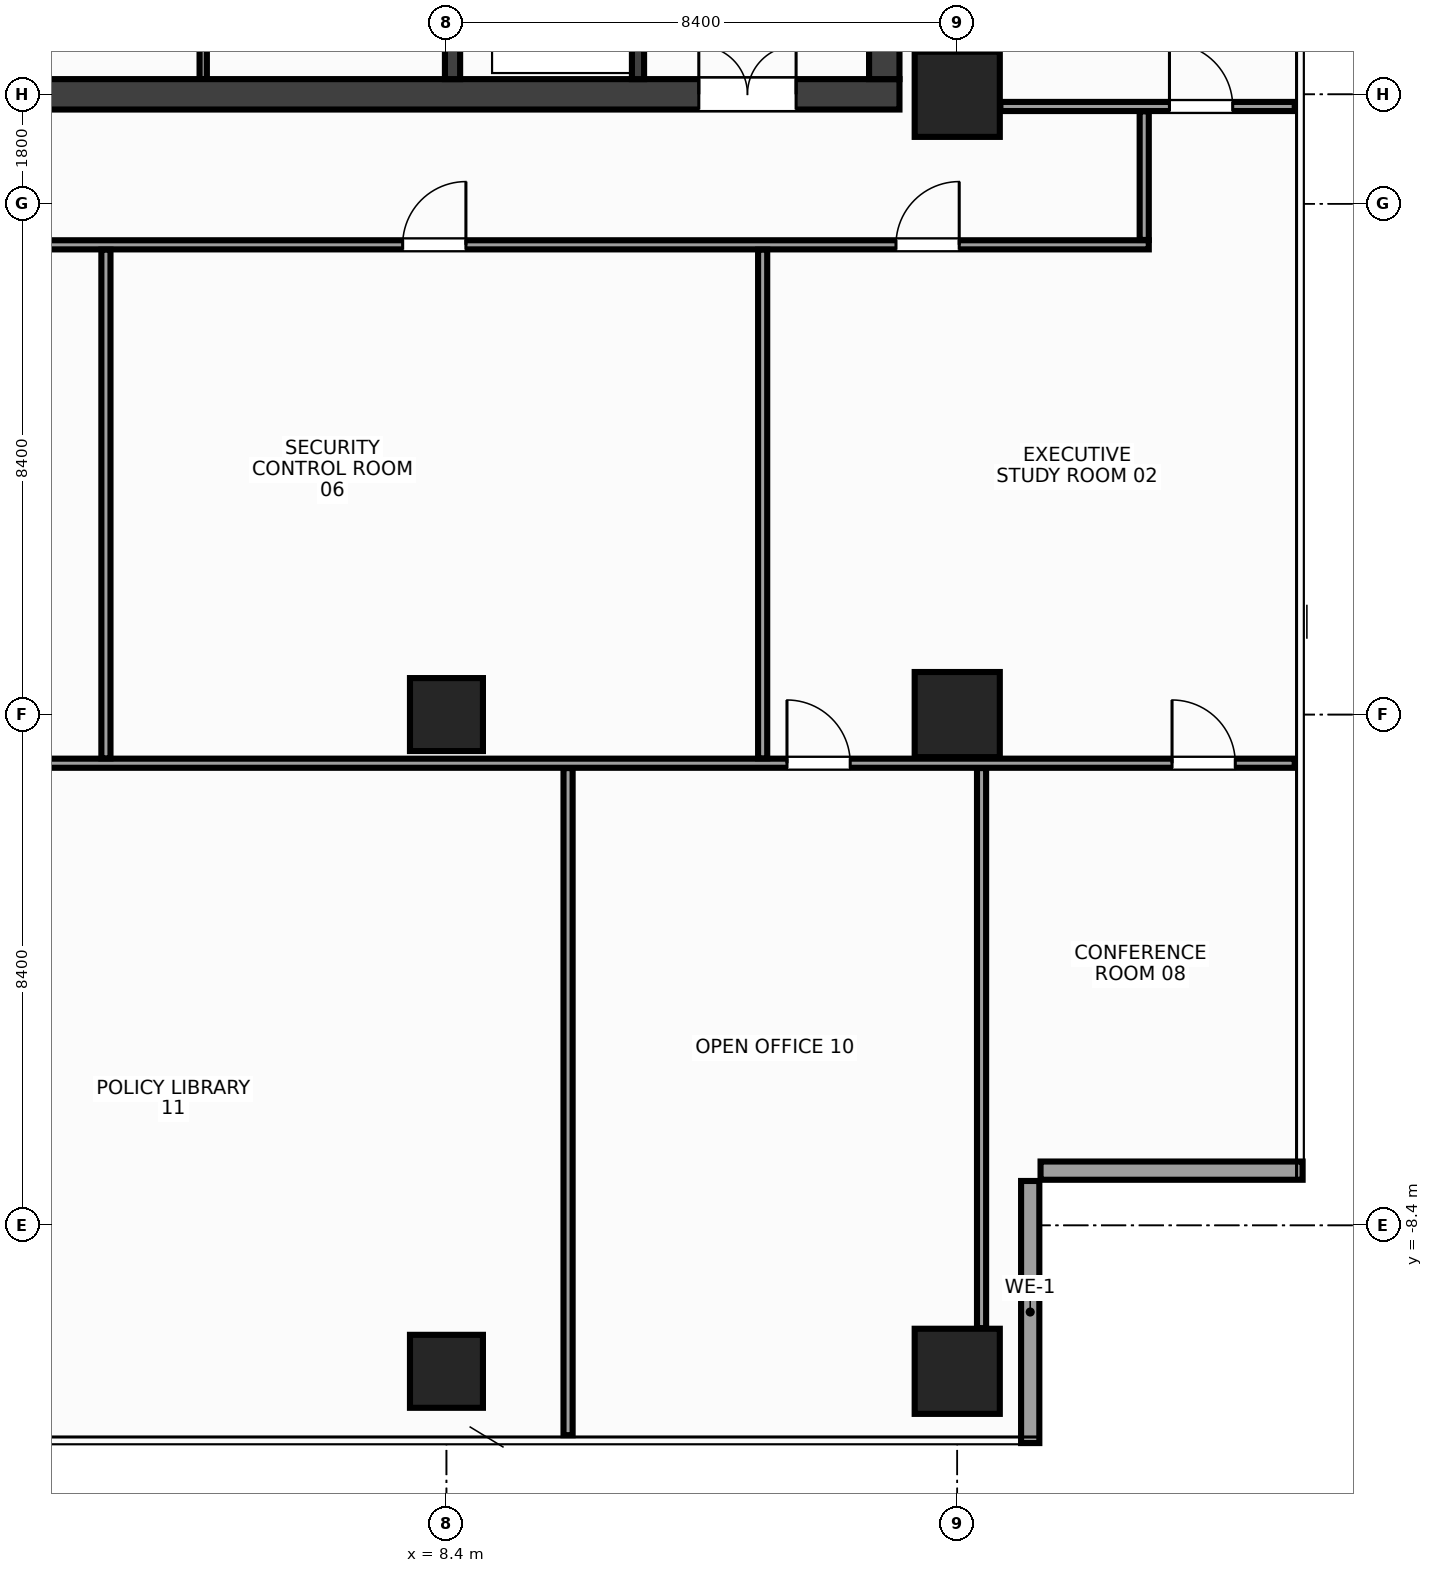
"""IFC4 building model, lengths in metres.
Left out: names, types, materials, properties, quantities, classifications, styles, units other than length and angle.
Written with IfcOpenShell. Run it as: python <this file> out.ifc"""

import sys

from ifc_helpers import new_model, si_unit, direction, frame, frame_2d, origin, origin_2d, place, context, subcontext, project, spatial, rectangle, extrude, source, transform, mapped, element, fill, save


model = new_model("IFC4")
c1 = context("Model", 3, precision=1e-05, world=origin(), true_north=direction((0.0, 1.0)))
c2 = subcontext(c1, "Body", "Model", "MODEL_VIEW")
j1 = project(units=[si_unit("LENGTHUNIT", "METRE"), si_unit("PLANEANGLEUNIT", "RADIAN")], contexts=[c1])
p1 = place(None, origin())
s1 = spatial("IfcSite", under=j1, at=p1, CompositionType="ELEMENT")
p2 = place(p1, origin())
s2 = spatial("IfcBuilding", under=s1, at=p2, CompositionType="ELEMENT")
p3 = place(p2, frame((0.0, 0.0, 243.2)))
s3 = spatial("IfcBuildingStorey", under=s2, at=p3, CompositionType="ELEMENT", Elevation=243.2)
m1 = source(origin(), c2, "Body", "SweptSolid", [
    extrude(rectangle(XDim=31.7, YDim=0.5, at=frame_2d((15.85, 0.0))), origin(), (0.0, 0.0, 1.0), 3.6),
])
p4 = place(p3, frame((-15.85, 10.2, 0.0), z_axis=(0.0, 0.0, 1.0), x_axis=(1.0, 0.0, 0.0)))
e1 = element("IfcWall", 1, at=p4, inside=s3, PredefinedType="SHEAR", context=c2, shape_type="MappedRepresentation", body=[
    mapped(m1, transform((0.0, 0.0, 0.0), x_axis=(1.0, 0.0, 0.0), y_axis=(0.0, 1.0, 0.0), z_axis=(0.0, 0.0, 1.0), scale=1.0)),
])
p5 = place(p4, frame((1.7, 0.0, 0.0)))
e2 = element("IfcOpeningElement", 2, at=p5, cuts=e1, PredefinedType="OPENING", context=c2, shape_type="SweptSolid", body=[
    extrude(rectangle(XDim=1.6, YDim=2.15, at=frame_2d((0.8, 1.075))), frame((0.0, 0.262, 0.0), z_axis=(0.0, -1.0, 0.0), x_axis=(1.0, 0.0, 0.0)), (0.0, 0.0, 1.0), 0.524),
])
p6 = place(p4, frame((28.4, 0.0, 0.0)))
e3 = element("IfcOpeningElement", 3, at=p6, cuts=e1, PredefinedType="OPENING", context=c2, shape_type="SweptSolid", body=[
    extrude(rectangle(XDim=1.6, YDim=2.15, at=frame_2d((0.8, 1.075))), frame((0.0, 0.262, 0.0), z_axis=(0.0, -1.0, 0.0), x_axis=(1.0, 0.0, 0.0)), (0.0, 0.0, 1.0), 0.524),
])
p7 = place(p4, frame((15.1, 0.0, 0.0)))
e4 = element("IfcOpeningElement", 4, at=p7, cuts=e1, PredefinedType="OPENING", context=c2, shape_type="SweptSolid", body=[
    extrude(rectangle(XDim=1.5, YDim=2.2, at=frame_2d((0.75, 1.1))), frame((0.0, 0.262, 0.0), z_axis=(0.0, -1.0, 0.0), x_axis=(1.0, 0.0, 0.0)), (0.0, 0.0, 1.0), 0.524),
])
m2 = source(origin(), c2, "Body", "SweptSolid", [
    extrude(rectangle(XDim=13.1, YDim=0.5, at=frame_2d((6.55, 0.0))), origin(), (0.0, 0.0, 1.0), 3.6),
])
p8 = place(p3, frame((15.6, 10.45, 0.0), z_axis=(0.0, 0.0, 1.0), x_axis=(0.0, 1.0, 0.0)))
e5 = element("IfcWall", 5, at=p8, inside=s3, PredefinedType="SHEAR", context=c2, shape_type="MappedRepresentation", body=[
    mapped(m2, transform((0.0, 0.0, 0.0), x_axis=(1.0, 0.0, 0.0), y_axis=(0.0, 1.0, 0.0), z_axis=(0.0, 0.0, 1.0), scale=1.0)),
])
m3 = source(origin(), c2, "Body", "SweptSolid", [
    extrude(rectangle(XDim=13.1, YDim=0.25, at=frame_2d((6.55, 0.0))), origin(), (0.0, 0.0, 1.0), 3.6),
])
p9 = place(p3, frame((8.5, 10.45, 0.0), z_axis=(0.0, 0.0, 1.0), x_axis=(0.0, 1.0, 0.0)))
e6 = element("IfcWall", 6, at=p9, inside=s3, PredefinedType="SHEAR", context=c2, shape_type="MappedRepresentation", body=[
    mapped(m3, transform((0.0, 0.0, 0.0), x_axis=(1.0, 0.0, 0.0), y_axis=(0.0, 1.0, 0.0), z_axis=(0.0, 0.0, 1.0), scale=1.0)),
])
p10 = place(p9, frame((10.0, 0.0, 0.0)))
e7 = element("IfcOpeningElement", 7, at=p10, cuts=e6, PredefinedType="OPENING", context=c2, shape_type="SweptSolid", body=[
    extrude(rectangle(XDim=0.95, YDim=2.15, at=frame_2d((0.475, 1.075))), frame((0.0, 0.137, 0.0), z_axis=(0.0, -1.0, 0.0), x_axis=(1.0, 0.0, 0.0)), (0.0, 0.0, 1.0), 0.274),
])
m4 = source(origin(), c2, "Body", "SweptSolid", [
    extrude(rectangle(XDim=3.2, YDim=0.2, at=frame_2d((1.6, 0.0))), origin(), (0.0, 0.0, 1.0), 3.6),
])
p11 = place(p3, frame((11.55, 10.45, 0.0), z_axis=(0.0, 0.0, 1.0), x_axis=(0.0, 1.0, 0.0)))
e8 = element("IfcWall", 8, at=p11, inside=s3, PredefinedType="SHEAR", context=c2, shape_type="MappedRepresentation", body=[
    mapped(m4, transform((0.0, 0.0, 0.0), x_axis=(1.0, 0.0, 0.0), y_axis=(0.0, 1.0, 0.0), z_axis=(0.0, 0.0, 1.0), scale=1.0)),
])
p12 = place(p11, frame((0.9, 0.0, 0.0)))
e9 = element("IfcOpeningElement", 9, at=p12, cuts=e8, PredefinedType="OPENING", context=c2, shape_type="SweptSolid", body=[
    extrude(rectangle(XDim=1.1, YDim=2.15, at=frame_2d((0.55, 1.075))), frame((0.0, 0.112, 0.0), z_axis=(0.0, -1.0, 0.0), x_axis=(1.0, 0.0, 0.0)), (0.0, 0.0, 1.0), 0.224),
])
m5 = source(origin(), c2, "Body", "SweptSolid", [
    extrude(rectangle(XDim=1.4, YDim=1.4, at=origin_2d()), origin(), (0.0, 0.0, 1.0), 3.6),
])
for number, where, z_axis, x_axis in (
    (10, (16.8, -10.8, 0.0), (0.0, 0.0, 1.0), (1.0, 0.0, 0.0)),
    (11, (16.8, 0.0, 0.0), (0.0, 0.0, 1.0), (1.0, 0.0, 0.0)),
    (12, (16.8, 10.2, 0.0), (0.0, 0.0, 1.0), (1.0, 0.0, 0.0)),
):
    element("IfcColumn", number, at=place(p3, frame(where, z_axis=z_axis, x_axis=x_axis)), inside=s3, PredefinedType="COLUMN", context=c2, shape_type="MappedRepresentation", body=[
        mapped(m5, transform((0.0, 0.0, 0.0), x_axis=(1.0, 0.0, 0.0), y_axis=(0.0, 1.0, 0.0), z_axis=(0.0, 0.0, 1.0), scale=1.0)),
    ])
m6 = source(origin(), c2, "Body", "SweptSolid", [
    extrude(rectangle(XDim=1.2, YDim=1.2, at=origin_2d()), origin(), (0.0, 0.0, 1.0), 3.6),
])
for number, where, z_axis, x_axis in (
    (13, (8.4, 0.0, 0.0), (0.0, 0.0, 1.0), (1.0, 0.0, 0.0)),
    (14, (8.4, -10.8, 0.0), (0.0, 0.0, 1.0), (1.0, 0.0, 0.0)),
):
    element("IfcColumn", number, at=place(p3, frame(where, z_axis=z_axis, x_axis=x_axis)), inside=s3, PredefinedType="COLUMN", context=c2, shape_type="MappedRepresentation", body=[
        mapped(m6, transform((0.0, 0.0, 0.0), x_axis=(1.0, 0.0, 0.0), y_axis=(0.0, 1.0, 0.0), z_axis=(0.0, 0.0, 1.0), scale=1.0)),
    ])
m7 = source(origin(), c2, "Body", "SweptSolid", [
    extrude(rectangle(XDim=4.31, YDim=0.3, at=frame_2d((2.155, 0.0))), origin(), (0.0, 0.0, 1.0), 2.75),
])
for number, where, z_axis, x_axis in (
    (15, (18.0, -11.98, 0.0), (0.0, 0.0, 1.0), (0.0, 1.0, 0.0)),
    (16, (18.17, -7.5, 0.0), (0.0, 0.0, 1.0), (1.0, 0.0, 0.0)),
):
    element("IfcWall", number, at=place(p3, frame(where, z_axis=z_axis, x_axis=x_axis)), inside=s3, PredefinedType="STANDARD", context=c2, shape_type="MappedRepresentation", body=[
        mapped(m7, transform((0.0, 0.0, 0.0), x_axis=(1.0, 0.0, 0.0), y_axis=(0.0, 1.0, 0.0), z_axis=(0.0, 0.0, 1.0), scale=1.0)),
    ])
m8 = source(origin(), c2, "Body", "SweptSolid", [
    extrude(rectangle(XDim=3.49, YDim=0.12, at=frame_2d((1.745, 0.0))), origin(), (0.0, 0.0, 1.0), 3.37),
])
p13 = place(p3, frame((4.4, 10.45, 0.0), z_axis=(0.0, 0.0, 1.0), x_axis=(0.0, 1.0, 0.0)))
e17 = element("IfcWall", 17, at=p13, inside=s3, PredefinedType="PARTITIONING", context=c2, shape_type="MappedRepresentation", body=[
    mapped(m8, transform((0.0, 0.0, 0.0), x_axis=(1.0, 0.0, 0.0), y_axis=(0.0, 1.0, 0.0), z_axis=(0.0, 0.0, 1.0), scale=1.0)),
])
m9 = source(origin(), c2, "Body", "SweptSolid", [
    extrude(rectangle(XDim=4.84, YDim=0.15, at=frame_2d((2.42, 0.0))), origin(), (0.0, 0.0, 1.0), 3.37),
])
p14 = place(p3, frame((17.51, 10.0, 0.0), z_axis=(0.0, 0.0, 1.0), x_axis=(1.0, 0.0, 0.0)))
e18 = element("IfcWall", 18, at=p14, inside=s3, PredefinedType="PARTITIONING", context=c2, shape_type="MappedRepresentation", body=[
    mapped(m9, transform((0.0, 0.0, 0.0), x_axis=(1.0, 0.0, 0.0), y_axis=(0.0, 1.0, 0.0), z_axis=(0.0, 0.0, 1.0), scale=1.0)),
])
p15 = place(p14, frame((2.78, 0.0, 0.0)))
e19 = element("IfcOpeningElement", 19, at=p15, cuts=e18, PredefinedType="OPENING", context=c2, shape_type="SweptSolid", body=[
    extrude(rectangle(XDim=1.04, YDim=2.2, at=frame_2d((0.52, 1.1))), frame((0.0, 0.087, 0.0), z_axis=(0.0, -1.0, 0.0), x_axis=(1.0, 0.0, 0.0)), (0.0, 0.0, 1.0), 0.174),
])
m10 = source(origin(), c2, "Body", "SweptSolid", [
    extrude(rectangle(XDim=21.9, YDim=0.15, at=frame_2d((10.95, 0.0))), origin(), (0.0, 0.0, 1.0), 2.755),
])
p16 = place(p3, frame((-1.95, 7.725, 0.0), z_axis=(0.0, 0.0, 1.0), x_axis=(1.0, 0.0, 0.0)))
e20 = element("IfcWall", 20, at=p16, inside=s3, PredefinedType="PARTITIONING", context=c2, shape_type="MappedRepresentation", body=[
    mapped(m10, transform((0.0, 0.0, 0.0), x_axis=(1.0, 0.0, 0.0), y_axis=(0.0, 1.0, 0.0), z_axis=(0.0, 0.0, 1.0), scale=1.0)),
])
p17 = place(p16, frame((17.742, 0.0, 0.0)))
e21 = element("IfcOpeningElement", 21, at=p17, cuts=e20, PredefinedType="OPENING", context=c2, shape_type="SweptSolid", body=[
    extrude(rectangle(XDim=1.04, YDim=2.2, at=frame_2d((0.52, 1.1))), frame((0.0, 0.087, 0.0), z_axis=(0.0, -1.0, 0.0), x_axis=(1.0, 0.0, 0.0)), (0.0, 0.0, 1.0), 0.174),
])
p18 = place(p16, frame((1.877, 0.0, 0.0)))
e22 = element("IfcOpeningElement", 22, at=p18, cuts=e20, PredefinedType="OPENING", context=c2, shape_type="SweptSolid", body=[
    extrude(rectangle(XDim=1.04, YDim=2.2, at=frame_2d((0.52, 1.1))), frame((0.0, 0.087, 0.0), z_axis=(0.0, -1.0, 0.0), x_axis=(1.0, 0.0, 0.0)), (0.0, 0.0, 1.0), 0.174),
])
p19 = place(p16, frame((9.63, 0.0, 0.0)))
e23 = element("IfcOpeningElement", 23, at=p19, cuts=e20, PredefinedType="OPENING", context=c2, shape_type="SweptSolid", body=[
    extrude(rectangle(XDim=1.04, YDim=2.2, at=frame_2d((0.52, 1.1))), frame((0.0, 0.087, 0.0), z_axis=(0.0, -1.0, 0.0), x_axis=(1.0, 0.0, 0.0)), (0.0, 0.0, 1.0), 0.174),
])
m11 = source(origin(), c2, "Body", "SweptSolid", [
    extrude(rectangle(XDim=2.115, YDim=0.15, at=frame_2d((1.058, 0.0))), origin(), (0.0, 0.0, 1.0), 3.37),
])
p20 = place(p3, frame((19.875, 7.805, 0.0), z_axis=(0.0, 0.0, 1.0), x_axis=(0.0, 1.0, 0.0)))
e24 = element("IfcWall", 24, at=p20, inside=s3, PredefinedType="PARTITIONING", context=c2, shape_type="MappedRepresentation", body=[
    mapped(m11, transform((0.0, 0.0, 0.0), x_axis=(1.0, 0.0, 0.0), y_axis=(0.0, 1.0, 0.0), z_axis=(0.0, 0.0, 1.0), scale=1.0)),
])
m12 = source(origin(), c2, "Body", "SweptSolid", [
    extrude(rectangle(XDim=24.295, YDim=0.15, at=frame_2d((12.147, 0.0))), origin(), (0.0, 0.0, 1.0), 2.755),
])
p21 = place(p3, frame((-1.945, -0.8, 0.0), z_axis=(0.0, 0.0, 1.0), x_axis=(1.0, 0.0, 0.0)))
e25 = element("IfcWall", 25, at=p21, inside=s3, PredefinedType="PARTITIONING", context=c2, shape_type="MappedRepresentation", body=[
    mapped(m12, transform((0.0, 0.0, 0.0), x_axis=(1.0, 0.0, 0.0), y_axis=(0.0, 1.0, 0.0), z_axis=(0.0, 0.0, 1.0), scale=1.0)),
])
p22 = place(p21, frame((22.278, 0.0, 0.0)))
e26 = element("IfcOpeningElement", 26, at=p22, cuts=e25, PredefinedType="OPENING", context=c2, shape_type="SweptSolid", body=[
    extrude(rectangle(XDim=1.04, YDim=2.2, at=frame_2d((0.52, 1.1))), frame((0.0, 0.087, 0.0), z_axis=(0.0, -1.0, 0.0), x_axis=(1.0, 0.0, 0.0)), (0.0, 0.0, 1.0), 0.174),
])
p23 = place(p21, frame((15.945, 0.0, 0.0)))
e27 = element("IfcOpeningElement", 27, at=p23, cuts=e25, PredefinedType="OPENING", context=c2, shape_type="SweptSolid", body=[
    extrude(rectangle(XDim=1.04, YDim=2.2, at=frame_2d((0.52, 1.1))), frame((0.0, 0.087, 0.0), z_axis=(0.0, -1.0, 0.0), x_axis=(1.0, 0.0, 0.0)), (0.0, 0.0, 1.0), 0.174),
])
m13 = source(origin(), c2, "Body", "SweptSolid", [
    extrude(rectangle(XDim=8.365, YDim=0.15, at=frame_2d((4.183, 0.0))), origin(), (0.0, 0.0, 1.0), 2.655),
])
for number, where, z_axis, x_axis in (
    (28, (2.8, -0.72, 0.0), (0.0, 0.0, 1.0), (0.0, 1.0, 0.0)),
    (29, (13.6, -0.72, 0.0), (0.0, 0.0, 1.0), (0.0, 1.0, 0.0)),
):
    element("IfcWall", number, at=place(p3, frame(where, z_axis=z_axis, x_axis=x_axis)), inside=s3, PredefinedType="PARTITIONING", context=c2, shape_type="MappedRepresentation", body=[
        mapped(m13, transform((0.0, 0.0, 0.0), x_axis=(1.0, 0.0, 0.0), y_axis=(0.0, 1.0, 0.0), z_axis=(0.0, 0.0, 1.0), scale=1.0)),
    ])
m14 = source(origin(), c2, "Body", "SweptSolid", [
    extrude(rectangle(XDim=10.97, YDim=0.15, at=frame_2d((5.485, 0.0))), origin(), (0.0, 0.0, 1.0), 2.905),
])
p24 = place(p3, frame((10.4, -11.85, 0.0), z_axis=(0.0, 0.0, 1.0), x_axis=(0.0, 1.0, 0.0)))
e30 = element("IfcWall", 30, at=p24, inside=s3, PredefinedType="PARTITIONING", context=c2, shape_type="MappedRepresentation", body=[
    mapped(m14, transform((0.0, 0.0, 0.0), x_axis=(1.0, 0.0, 0.0), y_axis=(0.0, 1.0, 0.0), z_axis=(0.0, 0.0, 1.0), scale=1.0)),
])
m15 = source(origin(), c2, "Body", "SweptSolid", [
    extrude(rectangle(XDim=9.21, YDim=0.15, at=frame_2d((4.605, 0.0))), origin(), (0.0, 0.0, 1.0), 3.37),
])
p25 = place(p3, frame((17.2, -10.09, 0.0), z_axis=(0.0, 0.0, 1.0), x_axis=(0.0, 1.0, 0.0)))
e31 = element("IfcWall", 31, at=p25, inside=s3, PredefinedType="PARTITIONING", context=c2, shape_type="MappedRepresentation", body=[
    mapped(m15, transform((0.0, 0.0, 0.0), x_axis=(1.0, 0.0, 0.0), y_axis=(0.0, 1.0, 0.0), z_axis=(0.0, 0.0, 1.0), scale=1.0)),
])
m16 = source(origin(), c2, "Body", "SweptSolid", [
    extrude(rectangle(XDim=1.6, YDim=2.15, at=frame_2d((0.8, 1.075))), frame((0.0, 0.025, 0.0), z_axis=(0.0, -1.0, 0.0), x_axis=(1.0, 0.0, 0.0)), (0.0, 0.0, 1.0), 0.05),
])
p26 = place(p6, origin())
e32 = element("IfcDoor", 32, at=p26, inside=s3, OperationType="DOUBLE_DOOR_SINGLE_SWING", PredefinedType="DOOR", context=c2, shape_type="MappedRepresentation", body=[
    mapped(m16, transform((0.0, 0.0, 0.0), x_axis=(1.0, 0.0, 0.0), y_axis=(0.0, 1.0, 0.0), z_axis=(0.0, 0.0, 1.0), scale=1.0)),
])
fill(e3, e32)
m17 = source(origin(), c2, "Body", "SweptSolid", [
    extrude(rectangle(XDim=1.04, YDim=2.2, at=frame_2d((0.52, 1.1))), frame((0.0, 0.025, 0.0), z_axis=(0.0, -1.0, 0.0), x_axis=(1.0, 0.0, 0.0)), (0.0, 0.0, 1.0), 0.05),
])
p27 = place(p17, origin())
e33 = element("IfcDoor", 33, at=p27, inside=s3, OperationType="SINGLE_SWING_RIGHT", PredefinedType="DOOR", context=c2, shape_type="MappedRepresentation", body=[
    mapped(m17, transform((0.0, 0.0, 0.0), x_axis=(1.0, 0.0, 0.0), y_axis=(0.0, 1.0, 0.0), z_axis=(0.0, 0.0, 1.0), scale=1.0)),
])
fill(e21, e33)
p28 = place(p19, origin())
e34 = element("IfcDoor", 34, at=p28, inside=s3, OperationType="SINGLE_SWING_RIGHT", PredefinedType="DOOR", context=c2, shape_type="MappedRepresentation", body=[
    mapped(m17, transform((0.0, 0.0, 0.0), x_axis=(1.0, 0.0, 0.0), y_axis=(0.0, 1.0, 0.0), z_axis=(0.0, 0.0, 1.0), scale=1.0)),
])
fill(e23, e34)
p29 = place(p15, origin())
e35 = element("IfcDoor", 35, at=p29, inside=s3, OperationType="SINGLE_SWING_LEFT", PredefinedType="DOOR", context=c2, shape_type="MappedRepresentation", body=[
    mapped(m17, transform((0.0, 0.0, 0.0), x_axis=(1.0, 0.0, 0.0), y_axis=(0.0, 1.0, 0.0), z_axis=(0.0, 0.0, 1.0), scale=1.0)),
])
fill(e19, e35)
p30 = place(p22, origin())
e36 = element("IfcDoor", 36, at=p30, inside=s3, OperationType="SINGLE_SWING_LEFT", PredefinedType="DOOR", context=c2, shape_type="MappedRepresentation", body=[
    mapped(m17, transform((0.0, 0.0, 0.0), x_axis=(1.0, 0.0, 0.0), y_axis=(0.0, 1.0, 0.0), z_axis=(0.0, 0.0, 1.0), scale=1.0)),
])
fill(e26, e36)
p31 = place(p23, origin())
e37 = element("IfcDoor", 37, at=p31, inside=s3, OperationType="SINGLE_SWING_LEFT", PredefinedType="DOOR", context=c2, shape_type="MappedRepresentation", body=[
    mapped(m17, transform((0.0, 0.0, 0.0), x_axis=(1.0, 0.0, 0.0), y_axis=(0.0, 1.0, 0.0), z_axis=(0.0, 0.0, 1.0), scale=1.0)),
])
fill(e27, e37)
save(model, sys.argv[1])
